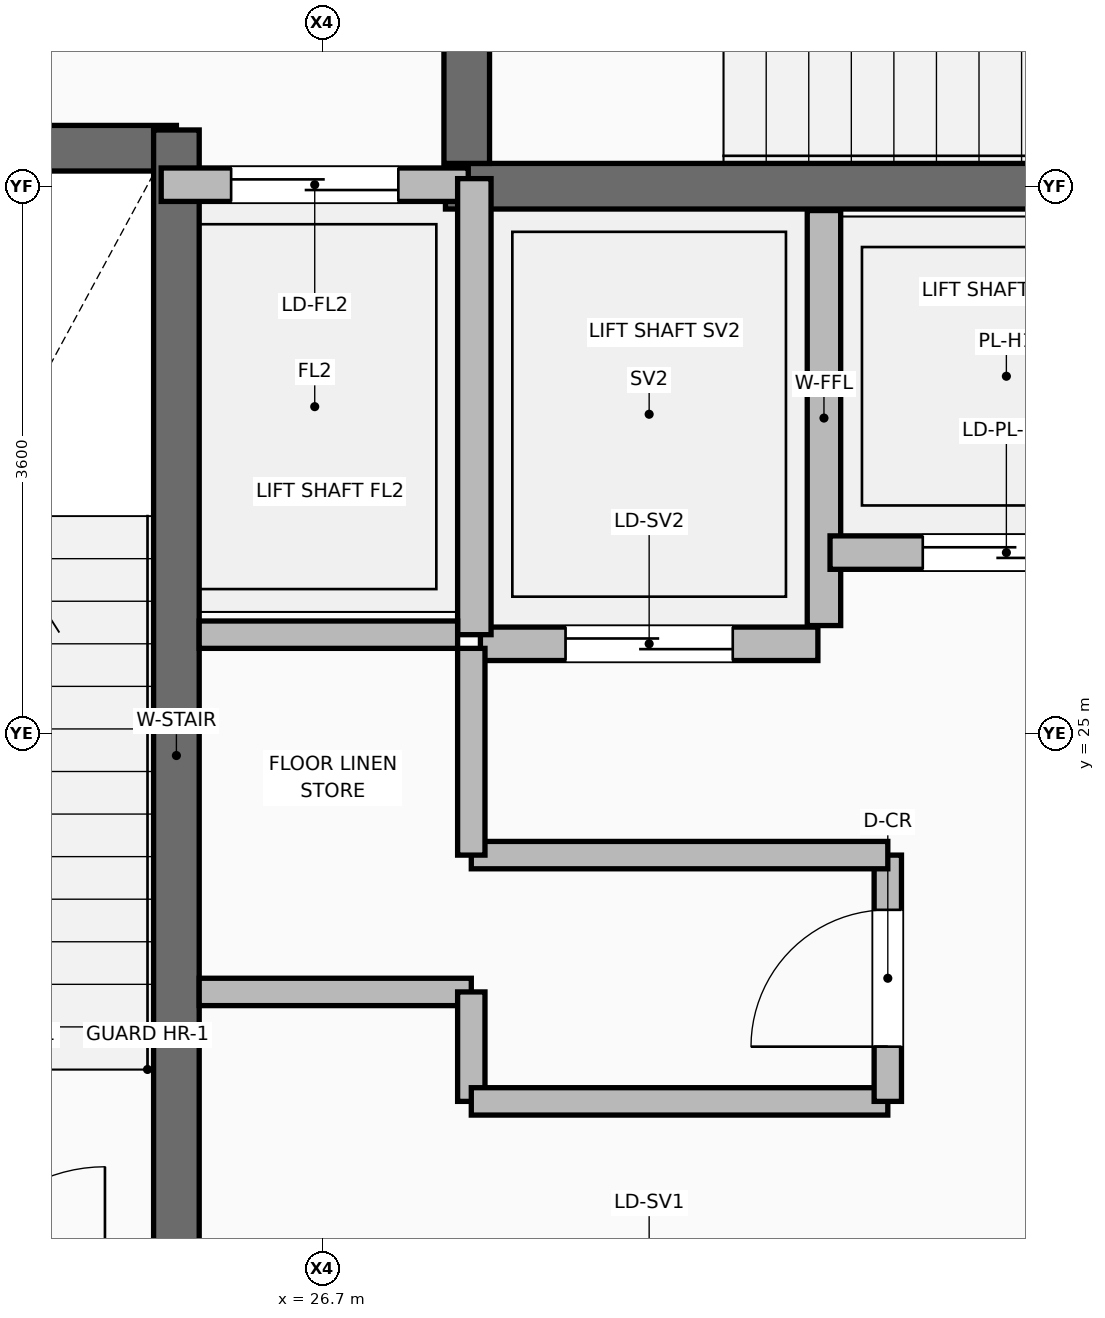
"""IFC4 building model, lengths in metres.
Left out: names, types, materials, properties, quantities, classifications, styles, units other than length and angle.
Written with IfcOpenShell. Run it as: python <this file> out.ifc"""

import sys

from ifc_helpers import new_model, si_unit, direction, frame, frame_2d, origin, place, context, subcontext, project, spatial, rectangle, extrude, element, fill, save


model = new_model("IFC4")
c1 = context("Model", 3, precision=1e-05, world=origin(), true_north=direction((0.0, 1.0)))
c2 = subcontext(c1, "Body", "Model", "MODEL_VIEW")
j1 = project(units=[si_unit("LENGTHUNIT", "METRE"), si_unit("PLANEANGLEUNIT", "RADIAN")], contexts=[c1])
p1 = place(None, origin())
s1 = spatial("IfcSite", under=j1, at=p1, CompositionType="ELEMENT")
p2 = place(p1, origin())
s2 = spatial("IfcBuilding", under=s1, at=p2, CompositionType="ELEMENT")
p3 = place(p2, frame((0.0, 0.0, 181.35)))
s3 = spatial("IfcBuildingStorey", under=s2, at=p3, CompositionType="ELEMENT", Elevation=181.35)
p4 = place(p3, frame((30.0, 25.71, 0.0), z_axis=(0.0, 0.0, 1.0), x_axis=(0.0, 1.0, 0.0)))
e1 = element("IfcWall", 1, at=p4, inside=s3, PredefinedType="PARTITIONING", context=c2, shape_type="SweptSolid", body=[
    extrude(rectangle(XDim=2.73, YDim=0.22, at=frame_2d((1.365, 0.0))), origin(), (0.0, 0.0, 1.0), 4.595),
])
p5 = place(p3, frame((22.125, 28.85, 0.0), z_axis=(0.0, 0.0, 1.0), x_axis=(1.0, 0.0, 0.0)))
e2 = element("IfcWall", 2, at=p5, inside=s3, PredefinedType="SHEAR", context=c2, shape_type="SweptSolid", body=[
    extrude(rectangle(XDim=3.615, YDim=0.3, at=frame_2d((1.808, 0.0))), origin(), (0.0, 0.0, 1.0), 4.62),
])
p6 = place(p3, frame((25.74, 20.98, 0.0), z_axis=(0.0, 0.0, 1.0), x_axis=(0.0, 1.0, 0.0)))
e3 = element("IfcWall", 3, at=p6, inside=s3, PredefinedType="SHEAR", context=c2, shape_type="SweptSolid", body=[
    extrude(rectangle(XDim=7.99, YDim=0.3, at=frame_2d((3.995, 0.0))), origin(), (0.0, 0.0, 1.0), 4.62),
])
p7 = place(p3, frame((27.51, 28.6, 0.0), z_axis=(0.0, 0.0, 1.0), x_axis=(1.0, 0.0, 0.0)))
e4 = element("IfcWall", 4, at=p7, inside=s3, PredefinedType="SHEAR", context=c2, shape_type="SweptSolid", body=[
    extrude(rectangle(XDim=8.03, YDim=0.3, at=frame_2d((4.015, 0.0))), origin(), (0.0, 0.0, 1.0), 4.62),
])
p8 = place(p3, frame((27.65, 28.75, 0.0), z_axis=(0.0, 0.0, 1.0), x_axis=(0.0, 1.0, 0.0)))
e5 = element("IfcWall", 5, at=p8, inside=s3, PredefinedType="SHEAR", context=c2, shape_type="SweptSolid", body=[
    extrude(rectangle(XDim=3.475, YDim=0.3, at=frame_2d((1.738, 0.0))), origin(), (0.0, 0.0, 1.0), 4.62),
])
p9 = place(p8, frame((1.0, 0.0, 0.0)))
e6 = element("IfcOpeningElement", 6, at=p9, cuts=e5, PredefinedType="OPENING", context=c2, shape_type="SweptSolid", body=[
    extrude(rectangle(XDim=1.05, YDim=2.1, at=frame_2d((0.525, 1.05))), frame((0.0, 0.16, 0.0), z_axis=(0.0, -1.0, 0.0), x_axis=(1.0, 0.0, 0.0)), (0.0, 0.0, 1.0), 0.32),
])
p10 = place(p3, frame((25.64, 28.61, 0.0), z_axis=(0.0, 0.0, 1.0), x_axis=(1.0, 0.0, 0.0)))
e7 = element("IfcWall", 7, at=p10, inside=s3, PredefinedType="PARTITIONING", context=c2, shape_type="SweptSolid", body=[
    extrude(rectangle(XDim=2.02, YDim=0.22, at=frame_2d((1.01, 0.0))), origin(), (0.0, 0.0, 1.0), 4.6),
])
p11 = place(p10, frame((0.46, 0.0, 0.0)))
e8 = element("IfcOpeningElement", 8, at=p11, cuts=e7, PredefinedType="OPENING", context=c2, shape_type="SweptSolid", body=[
    extrude(rectangle(XDim=1.1, YDim=2.2, at=frame_2d((0.55, 1.1))), frame((0.0, 0.12, 0.0), z_axis=(0.0, -1.0, 0.0), x_axis=(1.0, 0.0, 0.0)), (0.0, 0.0, 1.0), 0.24),
])
p12 = place(p3, frame((27.74, 25.59, 0.0), z_axis=(0.0, 0.0, 1.0), x_axis=(1.0, 0.0, 0.0)))
e9 = element("IfcWall", 9, at=p12, inside=s3, PredefinedType="PARTITIONING", context=c2, shape_type="SweptSolid", body=[
    extrude(rectangle(XDim=2.22, YDim=0.22, at=frame_2d((1.11, 0.0))), origin(), (0.0, 0.0, 1.0), 4.6),
])
p13 = place(p12, frame((0.56, 0.0, 0.0)))
e10 = element("IfcOpeningElement", 10, at=p13, cuts=e9, PredefinedType="OPENING", context=c2, shape_type="SweptSolid", body=[
    extrude(rectangle(XDim=1.1, YDim=2.2, at=frame_2d((0.55, 1.1))), frame((0.0, 0.12, 0.0), z_axis=(0.0, -1.0, 0.0), x_axis=(1.0, 0.0, 0.0)), (0.0, 0.0, 1.0), 0.24),
])
p14 = place(p3, frame((30.04, 26.19, 0.0), z_axis=(0.0, 0.0, 1.0), x_axis=(1.0, 0.0, 0.0)))
e11 = element("IfcWall", 11, at=p14, inside=s3, PredefinedType="PARTITIONING", context=c2, shape_type="SweptSolid", body=[
    extrude(rectangle(XDim=2.32, YDim=0.22, at=frame_2d((1.16, 0.0))), origin(), (0.0, 0.0, 1.0), 4.6),
])
p15 = place(p14, frame((0.61, 0.0, 0.0)))
e12 = element("IfcOpeningElement", 12, at=p15, cuts=e11, PredefinedType="OPENING", context=c2, shape_type="SweptSolid", body=[
    extrude(rectangle(XDim=1.1, YDim=2.2, at=frame_2d((0.55, 1.1))), frame((0.0, 0.12, 0.0), z_axis=(0.0, -1.0, 0.0), x_axis=(1.0, 0.0, 0.0)), (0.0, 0.0, 1.0), 0.24),
])
p16 = place(p3, frame((27.7, 25.65, 0.0), z_axis=(0.0, 0.0, 1.0), x_axis=(0.0, 1.0, 0.0)))
e13 = element("IfcWall", 13, at=p16, inside=s3, PredefinedType="PARTITIONING", context=c2, shape_type="SweptSolid", body=[
    extrude(rectangle(XDim=3.0, YDim=0.22, at=frame_2d((1.5, 0.0))), origin(), (0.0, 0.0, 1.0), 4.6),
])
p17 = place(p3, frame((25.89, 25.65, 0.0), z_axis=(0.0, 0.0, 1.0), x_axis=(1.0, 0.0, 0.0)))
e14 = element("IfcWall", 14, at=p17, inside=s3, PredefinedType="PARTITIONING", context=c2, shape_type="SweptSolid", body=[
    extrude(rectangle(XDim=1.7, YDim=0.18, at=frame_2d((0.85, 0.0))), origin(), (0.0, 0.0, 1.0), 4.6),
])
p18 = place(p3, frame((25.89, 23.3, 0.0), z_axis=(0.0, 0.0, 1.0), x_axis=(1.0, 0.0, 0.0)))
e15 = element("IfcWall", 15, at=p18, inside=s3, PredefinedType="PARTITIONING", context=c2, shape_type="SweptSolid", body=[
    extrude(rectangle(XDim=1.79, YDim=0.18, at=frame_2d((0.895, 0.0))), origin(), (0.0, 0.0, 1.0), 4.6),
])
p19 = place(p3, frame((27.68, 22.58, 0.0), z_axis=(0.0, 0.0, 1.0), x_axis=(0.0, 1.0, 0.0)))
e16 = element("IfcWall", 16, at=p19, inside=s3, PredefinedType="PARTITIONING", context=c2, shape_type="SweptSolid", body=[
    extrude(rectangle(XDim=0.72, YDim=0.18, at=frame_2d((0.36, 0.0))), origin(), (0.0, 0.0, 1.0), 4.6),
])
p20 = place(p3, frame((27.68, 22.58, 0.0), z_axis=(0.0, 0.0, 1.0), x_axis=(1.0, 0.0, 0.0)))
e17 = element("IfcWall", 17, at=p20, inside=s3, PredefinedType="PARTITIONING", context=c2, shape_type="SweptSolid", body=[
    extrude(rectangle(XDim=2.74, YDim=0.18, at=frame_2d((1.37, 0.0))), origin(), (0.0, 0.0, 1.0), 4.6),
])
p21 = place(p3, frame((30.42, 22.58, 0.0), z_axis=(0.0, 0.0, 1.0), x_axis=(0.0, 1.0, 0.0)))
e18 = element("IfcWall", 18, at=p21, inside=s3, PredefinedType="PARTITIONING", context=c2, shape_type="SweptSolid", body=[
    extrude(rectangle(XDim=1.62, YDim=0.18, at=frame_2d((0.81, 0.0))), origin(), (0.0, 0.0, 1.0), 4.6),
])
p22 = place(p21, frame((0.36, 0.0, 0.0)))
e19 = element("IfcOpeningElement", 19, at=p22, cuts=e18, PredefinedType="OPENING", context=c2, shape_type="SweptSolid", body=[
    extrude(rectangle(XDim=0.9, YDim=2.1, at=frame_2d((0.45, 1.05))), frame((0.0, 0.1, 0.0), z_axis=(0.0, -1.0, 0.0), x_axis=(1.0, 0.0, 0.0)), (0.0, 0.0, 1.0), 0.2),
])
p23 = place(p3, frame((27.68, 24.2, 0.0), z_axis=(0.0, 0.0, 1.0), x_axis=(1.0, 0.0, 0.0)))
e20 = element("IfcWall", 20, at=p23, inside=s3, PredefinedType="PARTITIONING", context=c2, shape_type="SweptSolid", body=[
    extrude(rectangle(XDim=2.74, YDim=0.18, at=frame_2d((1.37, 0.0))), origin(), (0.0, 0.0, 1.0), 4.6),
])
p24 = place(p3, frame((27.68, 24.2, 0.0), z_axis=(0.0, 0.0, 1.0), x_axis=(0.0, 1.0, 0.0)))
e21 = element("IfcWall", 21, at=p24, inside=s3, PredefinedType="PARTITIONING", context=c2, shape_type="SweptSolid", body=[
    extrude(rectangle(XDim=1.36, YDim=0.18, at=frame_2d((0.68, 0.0))), origin(), (0.0, 0.0, 1.0), 4.6),
])
p25 = place(p11, origin())
e22 = element("IfcDoor", 22, at=p25, inside=s3, OperationType="DOUBLE_DOOR_SLIDING", PredefinedType="DOOR", context=c2, shape_type="SweptSolid", body=[
    extrude(rectangle(XDim=1.1, YDim=2.2, at=frame_2d((0.55, 1.1))), frame((0.0, 0.025, 0.0), z_axis=(0.0, -1.0, 0.0), x_axis=(1.0, 0.0, 0.0)), (0.0, 0.0, 1.0), 0.05),
])
fill(e8, e22)
p26 = place(p13, frame((1.1, 0.0, 0.0), z_axis=(0.0, 0.0, 1.0), x_axis=(-1.0, 0.0, 0.0)))
e23 = element("IfcDoor", 23, at=p26, inside=s3, OperationType="DOUBLE_DOOR_SLIDING", PredefinedType="DOOR", context=c2, shape_type="SweptSolid", body=[
    extrude(rectangle(XDim=1.1, YDim=2.2, at=frame_2d((0.55, 1.1))), frame((0.0, 0.025, 0.0), z_axis=(0.0, -1.0, 0.0), x_axis=(1.0, 0.0, 0.0)), (0.0, 0.0, 1.0), 0.05),
])
fill(e10, e23)
p27 = place(p15, frame((1.1, 0.0, 0.0), z_axis=(0.0, 0.0, 1.0), x_axis=(-1.0, 0.0, 0.0)))
e24 = element("IfcDoor", 24, at=p27, inside=s3, OperationType="DOUBLE_DOOR_SLIDING", PredefinedType="DOOR", context=c2, shape_type="SweptSolid", body=[
    extrude(rectangle(XDim=1.1, YDim=2.2, at=frame_2d((0.55, 1.1))), frame((0.0, 0.025, 0.0), z_axis=(0.0, -1.0, 0.0), x_axis=(1.0, 0.0, 0.0)), (0.0, 0.0, 1.0), 0.05),
])
fill(e12, e24)
p28 = place(p22, origin())
e25 = element("IfcDoor", 25, at=p28, inside=s3, OperationType="SINGLE_SWING_LEFT", PredefinedType="DOOR", context=c2, shape_type="SweptSolid", body=[
    extrude(rectangle(XDim=0.9, YDim=2.1, at=frame_2d((0.45, 1.05))), frame((0.0, 0.025, 0.0), z_axis=(0.0, -1.0, 0.0), x_axis=(1.0, 0.0, 0.0)), (0.0, 0.0, 1.0), 0.05),
])
fill(e19, e25)
save(model, sys.argv[1])
